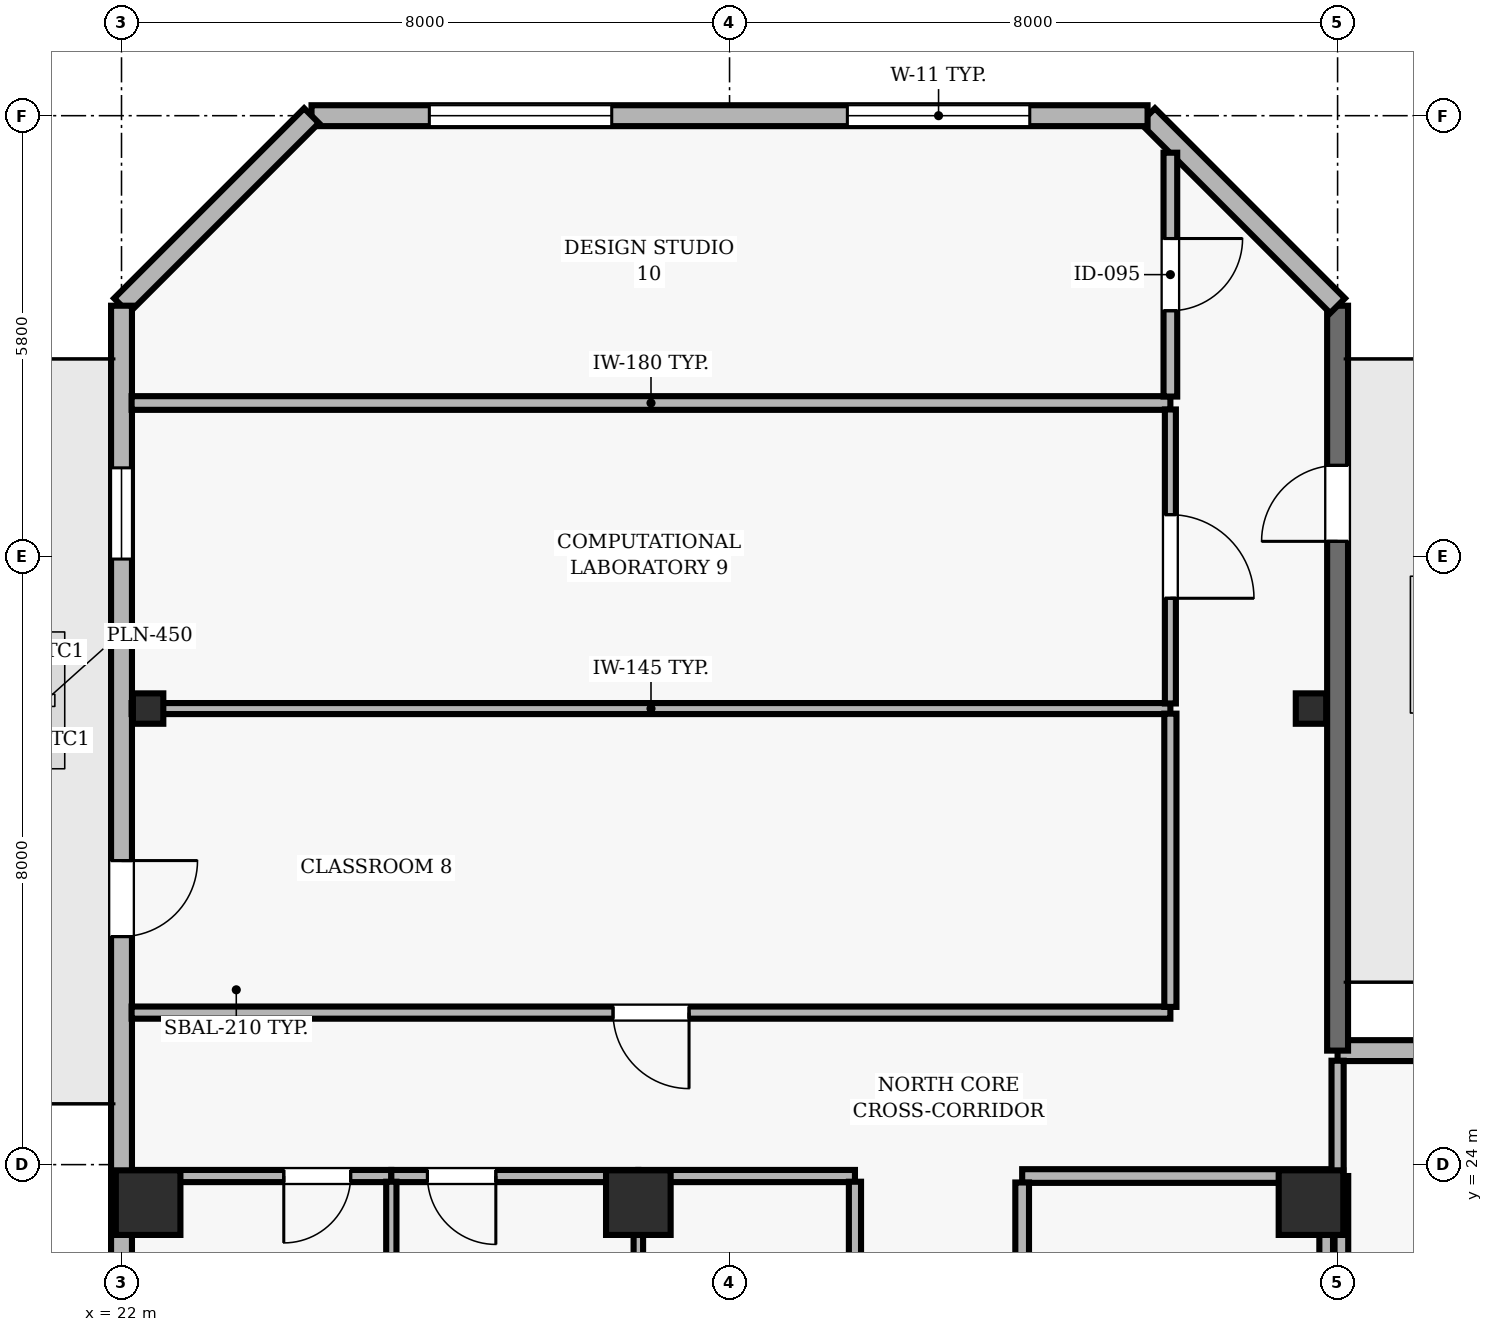
"""IFC4 building model, lengths in metres.
Left out: names, types, materials, properties, quantities, classifications, styles, units other than length and angle.
Written with IfcOpenShell. Run it as: python <this file> out.ifc"""

import sys

from ifc_helpers import new_model, si_unit, direction, frame, frame_2d, origin, origin_2d, place, context, subcontext, project, spatial, rectangle, hollow_rectangle, extrude, element, fill, save


model = new_model("IFC4")
c1 = context("Model", 3, precision=1e-05, world=origin(), true_north=direction((0.0, 1.0)))
c2 = subcontext(c1, "Body", "Model", "MODEL_VIEW")
j1 = project(units=[si_unit("LENGTHUNIT", "METRE"), si_unit("PLANEANGLEUNIT", "RADIAN")], contexts=[c1])
p1 = place(None, origin())
s1 = spatial("IfcSite", under=j1, at=p1, CompositionType="ELEMENT")
p2 = place(p1, origin())
s2 = spatial("IfcBuilding", under=s1, at=p2, CompositionType="ELEMENT")
p3 = place(p2, frame((0.0, 0.0, 248.2)))
s3 = spatial("IfcBuildingStorey", under=s2, at=p3, CompositionType="ELEMENT", Elevation=248.2)
for number, where, z_axis, x_axis in (
    (1, (22.35, 23.5, 0.0), (0.0, 0.0, 1.0), (1.0, 0.0, 0.0)),
    (2, (28.8, 23.5, 0.0), (0.0, 0.0, 1.0), (1.0, 0.0, 0.0)),
    (3, (37.65, 23.5, 0.0), (0.0, 0.0, 1.0), (1.0, 0.0, 0.0)),
):
    element("IfcColumn", number, at=place(p3, frame(where, z_axis=z_axis, x_axis=x_axis)), inside=s3, PredefinedType="COLUMN", context=c2, shape_type="SweptSolid", body=[
        extrude(rectangle(XDim=0.85, YDim=0.85, at=origin_2d()), origin(), (0.0, 0.0, 1.0), 3.9),
    ])
for number, where, z_axis, x_axis in (
    (4, (22.35, 30.0, 0.0), (0.0, 0.0, 1.0), (1.0, 0.0, 0.0)),
    (5, (37.65, 30.0, 0.0), (0.0, 0.0, 1.0), (1.0, 0.0, 0.0)),
):
    element("IfcColumn", number, at=place(p3, frame(where, z_axis=z_axis, x_axis=x_axis)), inside=s3, PredefinedType="COLUMN", context=c2, shape_type="SweptSolid", body=[
        extrude(hollow_rectangle(XDim=0.4, YDim=0.4, WallThickness=0.02, at=origin_2d()), origin(), (0.0, 0.0, 1.0), 3.9),
    ])
p4 = place(p3, frame((43.64, 25.5, 0.0), z_axis=(0.0, 0.0, 1.0), x_axis=(-1.0, 0.0, 0.0)))
e6 = element("IfcWall", 6, at=p4, inside=s3, PredefinedType="SOLIDWALL", context=c2, shape_type="SweptSolid", body=[
    extrude(rectangle(XDim=5.64, YDim=0.275, at=frame_2d((2.82, 0.0))), origin(), (0.0, 0.0, 1.0), 3.69),
])
p5 = place(p4, frame((1.62, 0.0, 0.9)))
e7 = element("IfcOpeningElement", 7, at=p5, cuts=e6, PredefinedType="OPENING", context=c2, shape_type="SweptSolid", body=[
    extrude(rectangle(XDim=2.4, YDim=1.8, at=frame_2d((1.2, 0.9))), frame((0.0, 0.147, 0.0), z_axis=(0.0, -1.0, 0.0), x_axis=(1.0, 0.0, 0.0)), (0.0, 0.0, 1.0), 0.295),
])
p6 = place(p3, frame((38.0, 25.5, 0.0), z_axis=(0.0, 0.0, 1.0), x_axis=(0.0, 1.0, 0.0)))
e8 = element("IfcWall", 8, at=p6, inside=s3, PredefinedType="SOLIDWALL", context=c2, shape_type="SweptSolid", body=[
    extrude(rectangle(XDim=9.8, YDim=0.275, at=frame_2d((4.9, 0.0))), origin(), (0.0, 0.0, 1.0), 3.69),
])
p7 = place(p6, frame((6.7, 0.0, 0.0)))
e9 = element("IfcOpeningElement", 9, at=p7, cuts=e8, PredefinedType="OPENING", context=c2, shape_type="SweptSolid", body=[
    extrude(rectangle(XDim=1.0, YDim=2.2, at=frame_2d((0.5, 1.1))), frame((0.0, 0.147, 0.0), z_axis=(0.0, -1.0, 0.0), x_axis=(1.0, 0.0, 0.0)), (0.0, 0.0, 1.0), 0.295),
])
p8 = place(p3, frame((38.0, 35.3, 0.0), z_axis=(0.0, 0.0, 1.0), x_axis=(-0.707106781187, 0.707106781187, 0.0)))
e10 = element("IfcWall", 10, at=p8, inside=s3, PredefinedType="SOLIDWALL", context=c2, shape_type="SweptSolid", body=[
    extrude(rectangle(XDim=3.536, YDim=0.275, at=frame_2d((1.768, 0.0))), origin(), (0.0, 0.0, 1.0), 3.69),
])
p9 = place(p3, frame((35.5, 37.8, 0.0), z_axis=(0.0, 0.0, 1.0), x_axis=(-1.0, 0.0, 0.0)))
e11 = element("IfcWall", 11, at=p9, inside=s3, PredefinedType="SOLIDWALL", context=c2, shape_type="SweptSolid", body=[
    extrude(rectangle(XDim=11.0, YDim=0.275, at=frame_2d((5.5, 0.0))), origin(), (0.0, 0.0, 1.0), 3.69),
])
p10 = place(p9, frame((1.55, 0.0, 0.9)))
e12 = element("IfcOpeningElement", 12, at=p10, cuts=e11, PredefinedType="OPENING", context=c2, shape_type="SweptSolid", body=[
    extrude(rectangle(XDim=2.4, YDim=2.2, at=frame_2d((1.2, 1.1))), frame((0.0, 0.147, 0.0), z_axis=(0.0, -1.0, 0.0), x_axis=(1.0, 0.0, 0.0)), (0.0, 0.0, 1.0), 0.295),
])
p11 = place(p9, frame((7.05, 0.0, 0.9)))
e13 = element("IfcOpeningElement", 13, at=p11, cuts=e11, PredefinedType="OPENING", context=c2, shape_type="SweptSolid", body=[
    extrude(rectangle(XDim=2.4, YDim=2.2, at=frame_2d((1.2, 1.1))), frame((0.0, 0.147, 0.0), z_axis=(0.0, -1.0, 0.0), x_axis=(1.0, 0.0, 0.0)), (0.0, 0.0, 1.0), 0.295),
])
p12 = place(p3, frame((24.5, 37.8, 0.0), z_axis=(0.0, 0.0, 1.0), x_axis=(-0.707106781187, -0.707106781187, 0.0)))
e14 = element("IfcWall", 14, at=p12, inside=s3, PredefinedType="SOLIDWALL", context=c2, shape_type="SweptSolid", body=[
    extrude(rectangle(XDim=3.536, YDim=0.275, at=frame_2d((1.768, 0.0))), origin(), (0.0, 0.0, 1.0), 3.69),
])
p13 = place(p3, frame((22.0, 35.3, 0.0), z_axis=(0.0, 0.0, 1.0), x_axis=(0.0, -1.0, 0.0)))
e15 = element("IfcWall", 15, at=p13, inside=s3, PredefinedType="SOLIDWALL", context=c2, shape_type="SweptSolid", body=[
    extrude(rectangle(XDim=32.8, YDim=0.275, at=frame_2d((16.4, 0.0))), origin(), (0.0, 0.0, 1.0), 3.69),
])
p14 = place(p13, frame((7.3, 0.0, 0.0)))
e16 = element("IfcOpeningElement", 16, at=p14, cuts=e15, PredefinedType="OPENING", context=c2, shape_type="SweptSolid", body=[
    extrude(rectangle(XDim=1.0, YDim=2.2, at=frame_2d((0.5, 1.1))), frame((0.0, 0.147, 0.0), z_axis=(0.0, -1.0, 0.0), x_axis=(1.0, 0.0, 0.0)), (0.0, 0.0, 1.0), 0.295),
])
p15 = place(p13, frame((2.133, 0.0, 0.9)))
e17 = element("IfcOpeningElement", 17, at=p15, cuts=e15, PredefinedType="OPENING", context=c2, shape_type="SweptSolid", body=[
    extrude(rectangle(XDim=1.2, YDim=1.6, at=frame_2d((0.6, 0.8))), frame((0.0, 0.147, 0.0), z_axis=(0.0, -1.0, 0.0), x_axis=(1.0, 0.0, 0.0)), (0.0, 0.0, 1.0), 0.295),
])
p16 = place(p13, frame((13.067, 0.0, 0.9)))
e18 = element("IfcOpeningElement", 18, at=p16, cuts=e15, PredefinedType="OPENING", context=c2, shape_type="SweptSolid", body=[
    extrude(rectangle(XDim=1.2, YDim=1.6, at=frame_2d((0.6, 0.8))), frame((0.0, 0.147, 0.0), z_axis=(0.0, -1.0, 0.0), x_axis=(1.0, 0.0, 0.0)), (0.0, 0.0, 1.0), 0.295),
])
p17 = place(p13, frame((18.533, 0.0, 0.9)))
e19 = element("IfcOpeningElement", 19, at=p17, cuts=e15, PredefinedType="OPENING", context=c2, shape_type="SweptSolid", body=[
    extrude(rectangle(XDim=1.2, YDim=1.6, at=frame_2d((0.6, 0.8))), frame((0.0, 0.147, 0.0), z_axis=(0.0, -1.0, 0.0), x_axis=(1.0, 0.0, 0.0)), (0.0, 0.0, 1.0), 0.295),
])
p18 = place(p13, frame((24.0, 0.0, 0.9)))
e20 = element("IfcOpeningElement", 20, at=p18, cuts=e15, PredefinedType="OPENING", context=c2, shape_type="SweptSolid", body=[
    extrude(rectangle(XDim=1.2, YDim=1.6, at=frame_2d((0.6, 0.8))), frame((0.0, 0.147, 0.0), z_axis=(0.0, -1.0, 0.0), x_axis=(1.0, 0.0, 0.0)), (0.0, 0.0, 1.0), 0.295),
])
p19 = place(p3, frame((25.55, 23.85, 0.0), z_axis=(0.0, 0.0, 1.0), x_axis=(-1.0, 0.0, 0.0)))
e21 = element("IfcWall", 21, at=p19, inside=s3, PredefinedType="PARTITIONING", context=c2, shape_type="SweptSolid", body=[
    extrude(rectangle(XDim=3.35, YDim=0.16, at=frame_2d((1.675, 0.0))), origin(), (0.0, 0.0, 1.0), 3.221),
])
p20 = place(p19, frame((0.535, 0.0, 0.0)))
e22 = element("IfcOpeningElement", 22, at=p20, cuts=e21, PredefinedType="OPENING", context=c2, shape_type="SweptSolid", body=[
    extrude(rectangle(XDim=0.88, YDim=2.1, at=frame_2d((0.44, 1.05))), frame((0.0, 0.09, 0.0), z_axis=(0.0, -1.0, 0.0), x_axis=(1.0, 0.0, 0.0)), (0.0, 0.0, 1.0), 0.18),
])
p21 = place(p3, frame((28.8, 23.85, 0.0), z_axis=(0.0, 0.0, 1.0), x_axis=(-1.0, 0.0, 0.0)))
e23 = element("IfcWall", 23, at=p21, inside=s3, PredefinedType="PARTITIONING", context=c2, shape_type="SweptSolid", body=[
    extrude(rectangle(XDim=3.25, YDim=0.16, at=frame_2d((1.625, 0.0))), origin(), (0.0, 0.0, 1.0), 3.221),
])
p22 = place(p21, frame((1.875, 0.0, 0.0)))
e24 = element("IfcOpeningElement", 24, at=p22, cuts=e23, PredefinedType="OPENING", context=c2, shape_type="SweptSolid", body=[
    extrude(rectangle(XDim=0.9, YDim=2.1, at=frame_2d((0.45, 1.05))), frame((0.0, 0.09, 0.0), z_axis=(0.0, -1.0, 0.0), x_axis=(1.0, 0.0, 0.0)), (0.0, 0.0, 1.0), 0.18),
])
p23 = place(p3, frame((31.65, 23.85, 0.0), z_axis=(0.0, 0.0, 1.0), x_axis=(-1.0, 0.0, 0.0)))
e25 = element("IfcWall", 25, at=p23, inside=s3, PredefinedType="PARTITIONING", context=c2, shape_type="SweptSolid", body=[
    extrude(rectangle(XDim=2.85, YDim=0.16, at=frame_2d((1.425, 0.0))), origin(), (0.0, 0.0, 1.0), 3.221),
])
p24 = place(p3, frame((35.8, 26.0, 0.0), z_axis=(0.0, 0.0, 1.0), x_axis=(-1.0, 0.0, 0.0)))
e26 = element("IfcWall", 26, at=p24, inside=s3, PredefinedType="PARTITIONING", context=c2, shape_type="SweptSolid", body=[
    extrude(rectangle(XDim=13.667, YDim=0.16, at=frame_2d((6.833, 0.0))), origin(), (0.0, 0.0, 1.0), 3.69),
])
p25 = place(p24, frame((6.333, 0.0, 0.0)))
e27 = element("IfcOpeningElement", 27, at=p25, cuts=e26, PredefinedType="OPENING", context=c2, shape_type="SweptSolid", body=[
    extrude(rectangle(XDim=1.0, YDim=2.1, at=frame_2d((0.5, 1.05))), frame((0.0, 0.09, 0.0), z_axis=(0.0, -1.0, 0.0), x_axis=(1.0, 0.0, 0.0)), (0.0, 0.0, 1.0), 0.18),
])
p26 = place(p3, frame((35.8, 30.0, 0.0), z_axis=(0.0, 0.0, 1.0), x_axis=(-1.0, 0.0, 0.0)))
e28 = element("IfcWall", 28, at=p26, inside=s3, PredefinedType="PARTITIONING", context=c2, shape_type="SweptSolid", body=[
    extrude(rectangle(XDim=13.667, YDim=0.145, at=frame_2d((6.833, 0.0))), origin(), (0.0, 0.0, 1.0), 3.221),
])
p27 = place(p3, frame((35.8, 34.02, 0.0), z_axis=(0.0, 0.0, 1.0), x_axis=(-1.0, 0.0, 0.0)))
e29 = element("IfcWall", 29, at=p27, inside=s3, PredefinedType="PARTITIONING", context=c2, shape_type="SweptSolid", body=[
    extrude(rectangle(XDim=13.667, YDim=0.18, at=frame_2d((6.833, 0.0))), origin(), (0.0, 0.0, 1.0), 3.69),
])
p28 = place(p3, frame((37.85, 23.85, 0.0), z_axis=(0.0, 0.0, 1.0), x_axis=(-1.0, 0.0, 0.0)))
e30 = element("IfcWall", 30, at=p28, inside=s3, PredefinedType="PARTITIONING", context=c2, shape_type="SweptSolid", body=[
    extrude(rectangle(XDim=4.0, YDim=0.18, at=frame_2d((2.0, 0.0))), origin(), (0.0, 0.0, 1.0), 3.221),
])
p29 = place(p3, frame((25.55, 19.16, 0.0), z_axis=(0.0, 0.0, 1.0), x_axis=(0.0, 1.0, 0.0)))
e31 = element("IfcWall", 31, at=p29, inside=s3, PredefinedType="PARTITIONING", context=c2, shape_type="SweptSolid", body=[
    extrude(rectangle(XDim=4.615, YDim=0.135, at=frame_2d((2.308, 0.0))), origin(), (0.0, 0.0, 1.0), 3.69),
])
p30 = place(p3, frame((28.8, 23.775, 0.0), z_axis=(0.0, 0.0, 1.0), x_axis=(0.0, -1.0, 0.0)))
e32 = element("IfcWall", 32, at=p30, inside=s3, PredefinedType="PARTITIONING", context=c2, shape_type="SweptSolid", body=[
    extrude(rectangle(XDim=4.615, YDim=0.125, at=frame_2d((2.308, 0.0))), origin(), (0.0, 0.0, 1.0), 3.69),
])
p31 = place(p3, frame((31.65, 19.01, 0.0), z_axis=(0.0, 0.0, 1.0), x_axis=(0.0, 1.0, 0.0)))
e33 = element("IfcWall", 33, at=p31, inside=s3, PredefinedType="PARTITIONING", context=c2, shape_type="SweptSolid", body=[
    extrude(rectangle(XDim=4.765, YDim=0.16, at=frame_2d((2.382, 0.0))), origin(), (0.0, 0.0, 1.0), 3.69),
])
p32 = place(p31, frame((1.932, 0.0, 0.0)))
e34 = element("IfcOpeningElement", 34, at=p32, cuts=e33, PredefinedType="OPENING", context=c2, shape_type="SweptSolid", body=[
    extrude(rectangle(XDim=0.9, YDim=2.1, at=frame_2d((0.45, 1.05))), frame((0.0, 0.09, 0.0), z_axis=(0.0, -1.0, 0.0), x_axis=(1.0, 0.0, 0.0)), (0.0, 0.0, 1.0), 0.18),
])
p33 = place(p3, frame((33.85, 17.735, 0.0), z_axis=(0.0, 0.0, 1.0), x_axis=(0.0, 1.0, 0.0)))
e35 = element("IfcWall", 35, at=p33, inside=s3, PredefinedType="PARTITIONING", context=c2, shape_type="SweptSolid", body=[
    extrude(rectangle(XDim=6.03, YDim=0.18, at=frame_2d((3.015, 0.0))), origin(), (0.0, 0.0, 1.0), 3.69),
])
p34 = place(p33, frame((2.54, 0.0, 0.0)))
e36 = element("IfcOpeningElement", 36, at=p34, cuts=e35, PredefinedType="OPENING", context=c2, shape_type="SweptSolid", body=[
    extrude(rectangle(XDim=0.95, YDim=2.1, at=frame_2d((0.475, 1.05))), frame((0.0, 0.1, 0.0), z_axis=(0.0, -1.0, 0.0), x_axis=(1.0, 0.0, 0.0)), (0.0, 0.0, 1.0), 0.2),
])
p35 = place(p3, frame((35.8, 29.933, 0.0), z_axis=(0.0, 0.0, 1.0), x_axis=(0.0, -1.0, 0.0)))
e37 = element("IfcWall", 37, at=p35, inside=s3, PredefinedType="PARTITIONING", context=c2, shape_type="SweptSolid", body=[
    extrude(rectangle(XDim=3.858, YDim=0.16, at=frame_2d((1.929, 0.0))), origin(), (0.0, 0.0, 1.0), 3.69),
])
p36 = place(p3, frame((35.8, 33.935, 0.0), z_axis=(0.0, 0.0, 1.0), x_axis=(0.0, -1.0, 0.0)))
e38 = element("IfcWall", 38, at=p36, inside=s3, PredefinedType="PARTITIONING", context=c2, shape_type="SweptSolid", body=[
    extrude(rectangle(XDim=3.868, YDim=0.145, at=frame_2d((1.934, 0.0))), origin(), (0.0, 0.0, 1.0), 3.69),
])
p37 = place(p36, frame((1.384, 0.0, 0.0)))
e39 = element("IfcOpeningElement", 39, at=p37, cuts=e38, PredefinedType="OPENING", context=c2, shape_type="SweptSolid", body=[
    extrude(rectangle(XDim=1.1, YDim=2.15, at=frame_2d((0.55, 1.075))), frame((0.0, 0.083, 0.0), z_axis=(0.0, -1.0, 0.0), x_axis=(1.0, 0.0, 0.0)), (0.0, 0.0, 1.0), 0.165),
])
p38 = place(p3, frame((35.8, 37.313, 0.0), z_axis=(0.0, 0.0, 1.0), x_axis=(0.0, -1.0, 0.0)))
e40 = element("IfcWall", 40, at=p38, inside=s3, PredefinedType="PARTITIONING", context=c2, shape_type="SweptSolid", body=[
    extrude(rectangle(XDim=3.208, YDim=0.18, at=frame_2d((1.604, 0.0))), origin(), (0.0, 0.0, 1.0), 3.69),
])
p39 = place(p38, frame((1.129, 0.0, 0.0)))
e41 = element("IfcOpeningElement", 41, at=p39, cuts=e40, PredefinedType="OPENING", context=c2, shape_type="SweptSolid", body=[
    extrude(rectangle(XDim=0.95, YDim=2.1, at=frame_2d((0.475, 1.05))), frame((0.0, 0.1, 0.0), z_axis=(0.0, -1.0, 0.0), x_axis=(1.0, 0.0, 0.0)), (0.0, 0.0, 1.0), 0.2),
])
p40 = place(p3, frame((37.85, 17.65, 0.0), z_axis=(0.0, 0.0, 1.0), x_axis=(0.0, 1.0, 0.0)))
e42 = element("IfcWall", 42, at=p40, inside=s3, PredefinedType="PARTITIONING", context=c2, shape_type="SweptSolid", body=[
    extrude(rectangle(XDim=6.115, YDim=0.18, at=frame_2d((3.058, 0.0))), origin(), (0.0, 0.0, 1.0), 3.221),
])
p41 = place(p3, frame((38.0, 23.85, 0.0), z_axis=(0.0, 0.0, 1.0), x_axis=(0.0, 1.0, 0.0)))
e43 = element("IfcWall", 43, at=p41, inside=s3, PredefinedType="PARTITIONING", context=c2, shape_type="SweptSolid", body=[
    extrude(rectangle(XDim=1.517, YDim=0.16, at=frame_2d((0.758, 0.0))), origin(), (0.0, 0.0, 1.0), 3.221),
])
p42 = place(p3, frame((38.05, 23.85, 0.0), z_axis=(0.0, 0.0, 1.0), x_axis=(0.0, -1.0, 0.0)))
e44 = element("IfcWall", 44, at=p42, inside=s3, PredefinedType="PARTITIONING", context=c2, shape_type="SweptSolid", body=[
    extrude(rectangle(XDim=7.775, YDim=0.18, at=frame_2d((3.888, 0.0))), origin(), (0.0, 0.0, 1.0), 3.221),
])
p43 = place(p7, origin())
e45 = element("IfcDoor", 45, at=p43, inside=s3, OperationType="SINGLE_SWING_LEFT", PredefinedType="DOOR", context=c2, shape_type="SweptSolid", body=[
    extrude(rectangle(XDim=1.0, YDim=2.2, at=frame_2d((0.5, 1.1))), frame((0.0, 0.025, 0.0), z_axis=(0.0, -1.0, 0.0), x_axis=(1.0, 0.0, 0.0)), (0.0, 0.0, 1.0), 0.05),
])
fill(e9, e45)
p44 = place(p10, origin())
e46 = element("IfcWindow", 46, at=p44, inside=s3, PartitioningType="SINGLE_PANEL", PredefinedType="WINDOW", context=c2, shape_type="SweptSolid", body=[
    extrude(rectangle(XDim=2.4, YDim=2.2, at=frame_2d((1.2, 1.1))), frame((0.0, 0.03, 0.0), z_axis=(0.0, -1.0, 0.0), x_axis=(1.0, 0.0, 0.0)), (0.0, 0.0, 1.0), 0.06),
])
fill(e12, e46)
p45 = place(p11, origin())
e47 = element("IfcWindow", 47, at=p45, inside=s3, PartitioningType="SINGLE_PANEL", PredefinedType="WINDOW", context=c2, shape_type="SweptSolid", body=[
    extrude(rectangle(XDim=2.4, YDim=2.2, at=frame_2d((1.2, 1.1))), frame((0.0, 0.03, 0.0), z_axis=(0.0, -1.0, 0.0), x_axis=(1.0, 0.0, 0.0)), (0.0, 0.0, 1.0), 0.06),
])
fill(e13, e47)
p46 = place(p14, origin())
e48 = element("IfcDoor", 48, at=p46, inside=s3, OperationType="SINGLE_SWING_LEFT", PredefinedType="DOOR", context=c2, shape_type="SweptSolid", body=[
    extrude(rectangle(XDim=1.0, YDim=2.2, at=frame_2d((0.5, 1.1))), frame((0.0, 0.025, 0.0), z_axis=(0.0, -1.0, 0.0), x_axis=(1.0, 0.0, 0.0)), (0.0, 0.0, 1.0), 0.05),
])
fill(e16, e48)
p47 = place(p15, origin())
e49 = element("IfcWindow", 49, at=p47, inside=s3, PartitioningType="SINGLE_PANEL", PredefinedType="WINDOW", context=c2, shape_type="SweptSolid", body=[
    extrude(rectangle(XDim=1.2, YDim=1.6, at=frame_2d((0.6, 0.8))), frame((0.0, 0.03, 0.0), z_axis=(0.0, -1.0, 0.0), x_axis=(1.0, 0.0, 0.0)), (0.0, 0.0, 1.0), 0.06),
])
fill(e17, e49)
p48 = place(p20, origin())
e50 = element("IfcDoor", 50, at=p48, inside=s3, OperationType="SINGLE_SWING_RIGHT", PredefinedType="DOOR", context=c2, shape_type="SweptSolid", body=[
    extrude(rectangle(XDim=0.88, YDim=2.1, at=frame_2d((0.44, 1.05))), frame((0.0, 0.025, 0.0), z_axis=(0.0, -1.0, 0.0), x_axis=(1.0, 0.0, 0.0)), (0.0, 0.0, 1.0), 0.05),
])
fill(e22, e50)
p49 = place(p22, origin())
e51 = element("IfcDoor", 51, at=p49, inside=s3, OperationType="SINGLE_SWING_LEFT", PredefinedType="DOOR", context=c2, shape_type="SweptSolid", body=[
    extrude(rectangle(XDim=0.9, YDim=2.1, at=frame_2d((0.45, 1.05))), frame((0.0, 0.025, 0.0), z_axis=(0.0, -1.0, 0.0), x_axis=(1.0, 0.0, 0.0)), (0.0, 0.0, 1.0), 0.05),
])
fill(e24, e51)
p50 = place(p25, origin())
e52 = element("IfcDoor", 52, at=p50, inside=s3, OperationType="SINGLE_SWING_LEFT", PredefinedType="DOOR", context=c2, shape_type="SweptSolid", body=[
    extrude(rectangle(XDim=1.0, YDim=2.1, at=frame_2d((0.5, 1.05))), frame((0.0, 0.025, 0.0), z_axis=(0.0, -1.0, 0.0), x_axis=(1.0, 0.0, 0.0)), (0.0, 0.0, 1.0), 0.05),
])
fill(e27, e52)
p51 = place(p37, origin())
e53 = element("IfcDoor", 53, at=p51, inside=s3, OperationType="SINGLE_SWING_RIGHT", PredefinedType="DOOR", context=c2, shape_type="SweptSolid", body=[
    extrude(rectangle(XDim=1.1, YDim=2.15, at=frame_2d((0.55, 1.075))), frame((0.0, 0.025, 0.0), z_axis=(0.0, -1.0, 0.0), x_axis=(1.0, 0.0, 0.0)), (0.0, 0.0, 1.0), 0.05),
])
fill(e39, e53)
p52 = place(p39, origin())
e54 = element("IfcDoor", 54, at=p52, inside=s3, OperationType="SINGLE_SWING_LEFT", PredefinedType="DOOR", context=c2, shape_type="SweptSolid", body=[
    extrude(rectangle(XDim=0.95, YDim=2.1, at=frame_2d((0.475, 1.05))), frame((0.0, 0.025, 0.0), z_axis=(0.0, -1.0, 0.0), x_axis=(1.0, 0.0, 0.0)), (0.0, 0.0, 1.0), 0.05),
])
fill(e41, e54)
save(model, sys.argv[1])
